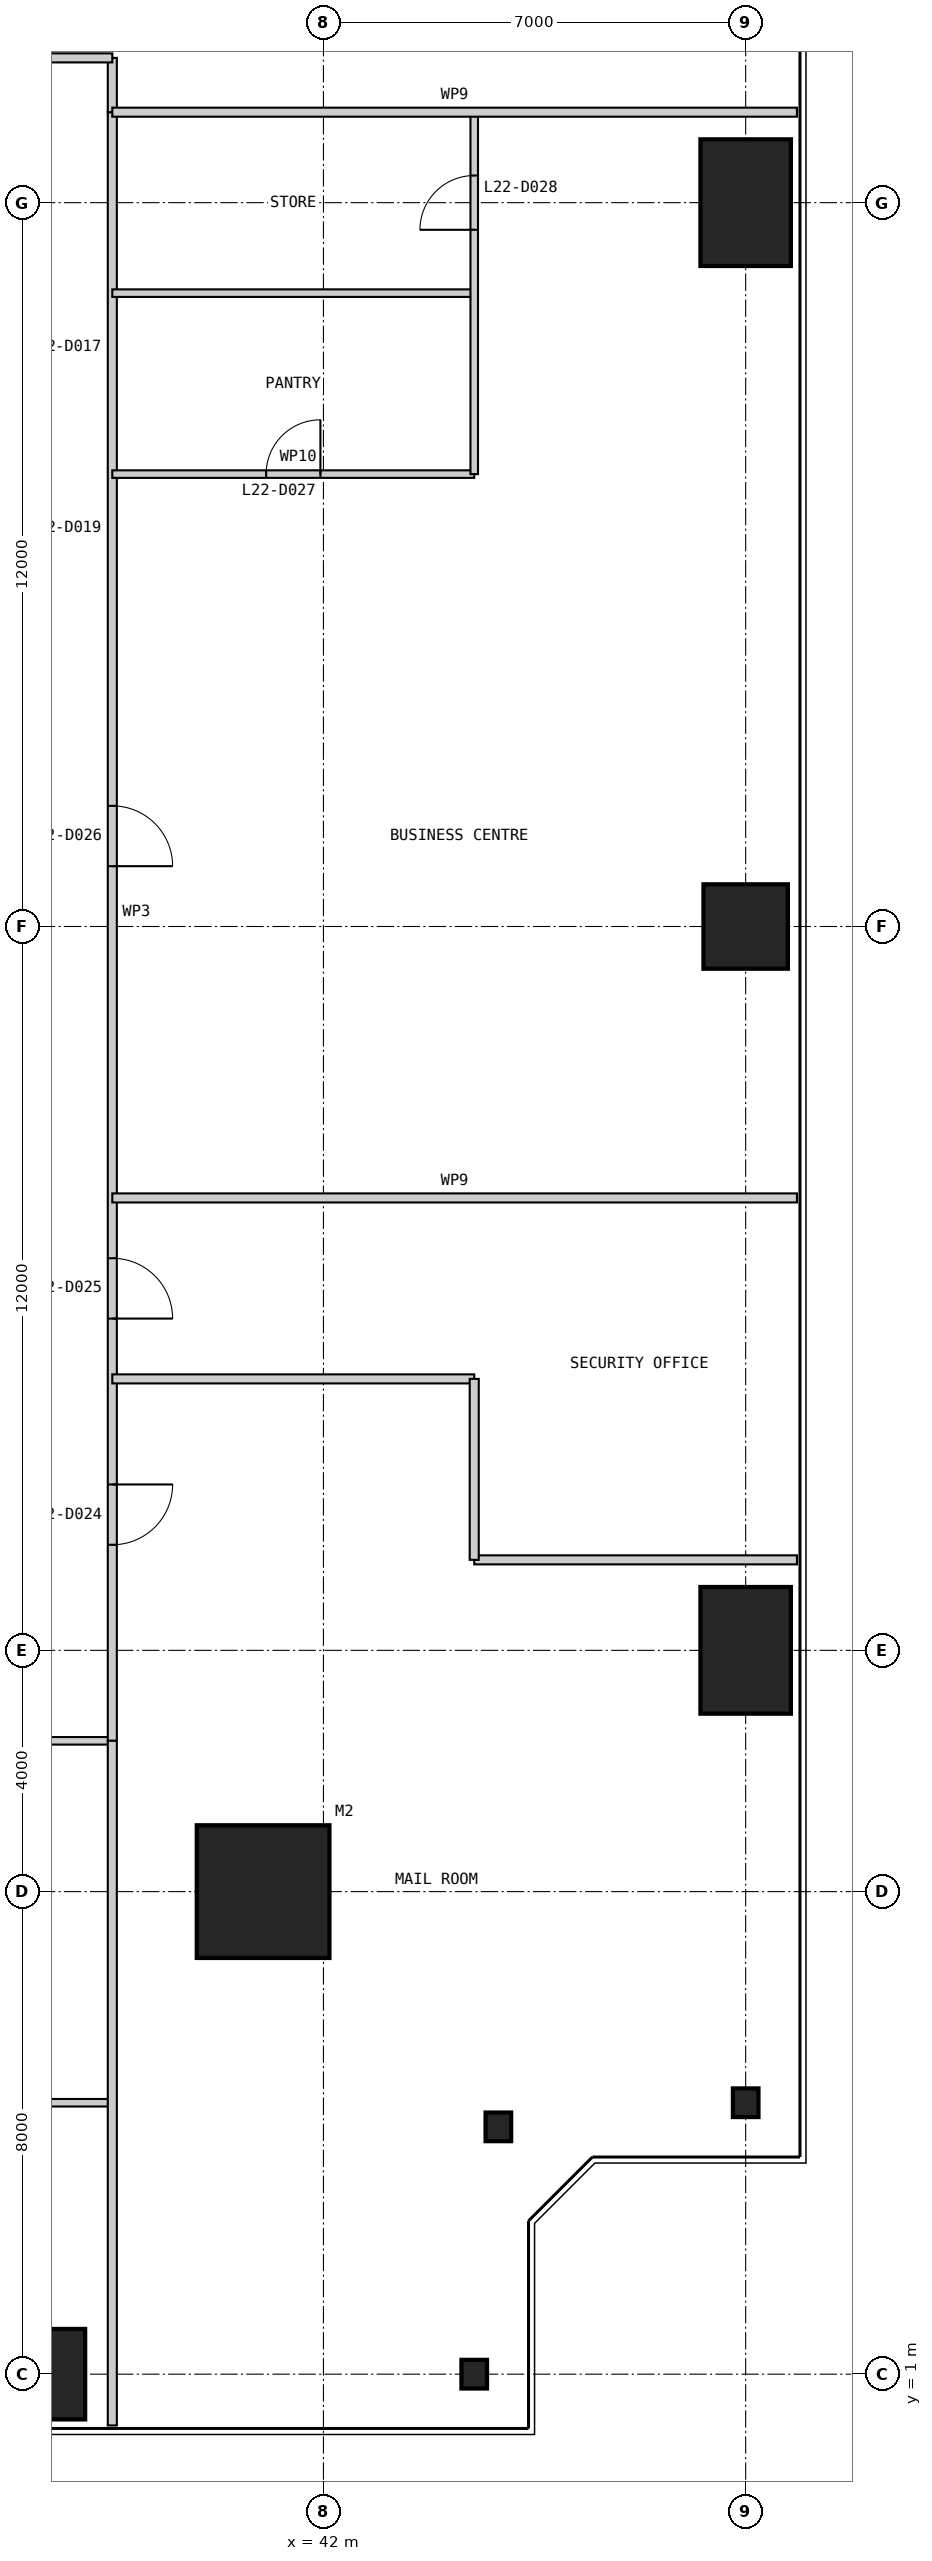
"""IFC4 building model, lengths in metres.
Left out: names, types, materials, properties, quantities, classifications, styles, units other than length and angle.
Written with IfcOpenShell. Run it as: python <this file> out.ifc"""

import sys

from ifc_helpers import new_model, si_unit, direction, frame, frame_2d, origin, origin_2d, place, context, subcontext, project, spatial, rectangle, i_section, extrude, element, fill, save


model = new_model("IFC4")
c1 = context("Model", 3, precision=1e-05, world=origin(), true_north=direction((0.0, 1.0)))
c2 = subcontext(c1, "Body", "Model", "MODEL_VIEW")
j1 = project(units=[si_unit("LENGTHUNIT", "METRE"), si_unit("PLANEANGLEUNIT", "RADIAN")], contexts=[c1])
p1 = place(None, origin())
s1 = spatial("IfcSite", under=j1, at=p1, CompositionType="ELEMENT")
p2 = place(p1, origin())
s2 = spatial("IfcBuilding", under=s1, at=p2, CompositionType="ELEMENT")
p3 = place(p2, frame((0.0, 0.0, 97.0)))
s3 = spatial("IfcBuildingStorey", under=s2, at=p3, CompositionType="ELEMENT", Elevation=97.0)
p4 = place(p3, frame((41.0, 9.0, 0.0), z_axis=(0.0, 0.0, 1.0), x_axis=(1.0, 0.0, 0.0)))
e1 = element("IfcColumn", 1, at=p4, inside=s3, PredefinedType="COLUMN", context=c2, shape_type="SweptSolid", body=[
    extrude(rectangle(XDim=2.2, YDim=2.2, at=origin_2d()), origin(), (0.0, 0.0, 1.0), 5.4),
])
p5 = place(p3, frame((37.0, 1.0, 0.0), z_axis=(0.0, 0.0, 1.0), x_axis=(1.0, 0.0, 0.0)))
e2 = element("IfcColumn", 2, at=p5, inside=s3, PredefinedType="COLUMN", context=c2, shape_type="SweptSolid", body=[
    extrude(rectangle(XDim=2.1, YDim=1.5, at=origin_2d()), origin(), (0.0, 0.0, 1.0), 5.4),
])
for number, where, z_axis, x_axis in (
    (3, (44.5, 1.0, 0.0), (0.0, 0.0, 1.0), (1.0, 0.0, 0.0)),
    (4, (44.9, 5.1, 0.0), (0.0, 0.0, 1.0), (1.0, 0.0, 0.0)),
    (5, (49.0, 5.5, 0.0), (0.0, 0.0, 1.0), (1.0, 0.0, 0.0)),
):
    element("IfcColumn", number, at=place(p3, frame(where, z_axis=z_axis, x_axis=x_axis)), inside=s3, PredefinedType="COLUMN", context=c2, shape_type="SweptSolid", body=[
        extrude(i_section(OverallWidth=0.424, OverallDepth=0.475, WebThickness=0.048, FlangeThickness=0.077, at=origin_2d()), origin(), (0.0, 0.0, 1.0), 5.4),
    ])
p6 = place(p3, frame((49.0, 13.0, 0.0), z_axis=(0.0, 0.0, 1.0), x_axis=(1.0, 0.0, 0.0)))
e6 = element("IfcColumn", 6, at=p6, inside=s3, PredefinedType="COLUMN", context=c2, shape_type="SweptSolid", body=[
    extrude(rectangle(XDim=1.5, YDim=2.1, at=origin_2d()), origin(), (0.0, 0.0, 1.0), 5.4),
])
p7 = place(p3, frame((49.0, 25.0, 0.0), z_axis=(0.0, 0.0, 1.0), x_axis=(1.0, 0.0, 0.0)))
e7 = element("IfcColumn", 7, at=p7, inside=s3, PredefinedType="COLUMN", context=c2, shape_type="SweptSolid", body=[
    extrude(rectangle(XDim=1.4, YDim=1.4, at=origin_2d()), origin(), (0.0, 0.0, 1.0), 5.4),
])
p8 = place(p3, frame((49.0, 37.0, 0.0), z_axis=(0.0, 0.0, 1.0), x_axis=(1.0, 0.0, 0.0)))
e8 = element("IfcColumn", 8, at=p8, inside=s3, PredefinedType="COLUMN", context=c2, shape_type="SweptSolid", body=[
    extrude(rectangle(XDim=1.5, YDim=2.1, at=origin_2d()), origin(), (0.0, 0.0, 1.0), 5.4),
])
for number, where, z_axis, x_axis in (
    (9, (35.5, 5.5, 0.0), (0.0, 0.0, 1.0), (1.0, 0.0, 0.0)),
    (10, (35.5, 11.5, 0.0), (0.0, 0.0, 1.0), (1.0, 0.0, 0.0)),
):
    element("IfcWall", number, at=place(p3, frame(where, z_axis=z_axis, x_axis=x_axis)), inside=s3, PredefinedType="PARTITIONING", context=c2, shape_type="SweptSolid", body=[
        extrude(rectangle(XDim=3.0, YDim=0.125, at=frame_2d((1.5, 0.0))), origin(), (0.0, 0.0, 1.0), 5.25),
    ])
p9 = place(p3, frame((38.5, 11.5, 0.0), z_axis=(0.0, 0.0, 1.0), x_axis=(0.0, 1.0, 0.0)))
e11 = element("IfcWall", 11, at=p9, inside=s3, PredefinedType="PARTITIONING", context=c2, shape_type="SweptSolid", body=[
    extrude(rectangle(XDim=27.0, YDim=0.15, at=frame_2d((13.5, 0.0))), origin(), (0.0, 0.0, 1.0), 5.25),
])
p10 = place(p9, frame((3.25, 0.0, 0.0)))
e12 = element("IfcOpeningElement", 12, at=p10, cuts=e11, PredefinedType="OPENING", context=c2, shape_type="SweptSolid", body=[
    extrude(rectangle(XDim=1.0, YDim=2.2, at=frame_2d((0.5, 1.1))), frame((0.0, 0.085, 0.0), z_axis=(0.0, -1.0, 0.0), x_axis=(1.0, 0.0, 0.0)), (0.0, 0.0, 1.0), 0.17),
])
p11 = place(p9, frame((7.0, 0.0, 0.0)))
e13 = element("IfcOpeningElement", 13, at=p11, cuts=e11, PredefinedType="OPENING", context=c2, shape_type="SweptSolid", body=[
    extrude(rectangle(XDim=1.0, YDim=2.2, at=frame_2d((0.5, 1.1))), frame((0.0, 0.085, 0.0), z_axis=(0.0, -1.0, 0.0), x_axis=(1.0, 0.0, 0.0)), (0.0, 0.0, 1.0), 0.17),
])
p12 = place(p9, frame((14.5, 0.0, 0.0)))
e14 = element("IfcOpeningElement", 14, at=p12, cuts=e11, PredefinedType="OPENING", context=c2, shape_type="SweptSolid", body=[
    extrude(rectangle(XDim=1.0, YDim=2.2, at=frame_2d((0.5, 1.1))), frame((0.0, 0.085, 0.0), z_axis=(0.0, -1.0, 0.0), x_axis=(1.0, 0.0, 0.0)), (0.0, 0.0, 1.0), 0.17),
])
p13 = place(p3, frame((38.5, 0.15, 0.0), z_axis=(0.0, 0.0, 1.0), x_axis=(0.0, 1.0, 0.0)))
e15 = element("IfcWall", 15, at=p13, inside=s3, PredefinedType="PARTITIONING", context=c2, shape_type="SweptSolid", body=[
    extrude(rectangle(XDim=11.35, YDim=0.15, at=frame_2d((5.675, 0.0))), origin(), (0.0, 0.0, 1.0), 5.25),
])
p14 = place(p3, frame((49.85, 14.5, 0.0), z_axis=(0.0, 0.0, 1.0), x_axis=(-1.0, 0.0, 0.0)))
e16 = element("IfcWall", 16, at=p14, inside=s3, PredefinedType="PARTITIONING", context=c2, shape_type="SweptSolid", body=[
    extrude(rectangle(XDim=5.35, YDim=0.15, at=frame_2d((2.675, 0.0))), origin(), (0.0, 0.0, 1.0), 5.25),
])
p15 = place(p3, frame((44.5, 17.5, 0.0), z_axis=(0.0, 0.0, 1.0), x_axis=(-1.0, 0.0, 0.0)))
e17 = element("IfcWall", 17, at=p15, inside=s3, PredefinedType="PARTITIONING", context=c2, shape_type="SweptSolid", body=[
    extrude(rectangle(XDim=6.0, YDim=0.15, at=frame_2d((3.0, 0.0))), origin(), (0.0, 0.0, 1.0), 5.25),
])
p16 = place(p3, frame((49.85, 20.5, 0.0), z_axis=(0.0, 0.0, 1.0), x_axis=(-1.0, 0.0, 0.0)))
e18 = element("IfcWall", 18, at=p16, inside=s3, PredefinedType="PARTITIONING", context=c2, shape_type="SweptSolid", body=[
    extrude(rectangle(XDim=11.35, YDim=0.15, at=frame_2d((5.675, 0.0))), origin(), (0.0, 0.0, 1.0), 5.25),
])
p17 = place(p3, frame((44.5, 32.5, 0.0), z_axis=(0.0, 0.0, 1.0), x_axis=(-1.0, 0.0, 0.0)))
e19 = element("IfcWall", 19, at=p17, inside=s3, PredefinedType="PARTITIONING", context=c2, shape_type="SweptSolid", body=[
    extrude(rectangle(XDim=6.0, YDim=0.125, at=frame_2d((3.0, 0.0))), origin(), (0.0, 0.0, 1.0), 5.25),
])
p18 = place(p17, frame((2.55, 0.0, 0.0)))
e20 = element("IfcOpeningElement", 20, at=p18, cuts=e19, PredefinedType="OPENING", context=c2, shape_type="SweptSolid", body=[
    extrude(rectangle(XDim=0.9, YDim=2.2, at=frame_2d((0.45, 1.1))), frame((0.0, 0.073, 0.0), z_axis=(0.0, -1.0, 0.0), x_axis=(1.0, 0.0, 0.0)), (0.0, 0.0, 1.0), 0.145),
])
p19 = place(p3, frame((44.5, 35.5, 0.0), z_axis=(0.0, 0.0, 1.0), x_axis=(-1.0, 0.0, 0.0)))
e21 = element("IfcWall", 21, at=p19, inside=s3, PredefinedType="PARTITIONING", context=c2, shape_type="SweptSolid", body=[
    extrude(rectangle(XDim=6.0, YDim=0.125, at=frame_2d((3.0, 0.0))), origin(), (0.0, 0.0, 1.0), 5.25),
])
p20 = place(p3, frame((44.5, 14.5, 0.0), z_axis=(0.0, 0.0, 1.0), x_axis=(0.0, 1.0, 0.0)))
e22 = element("IfcWall", 22, at=p20, inside=s3, PredefinedType="PARTITIONING", context=c2, shape_type="SweptSolid", body=[
    extrude(rectangle(XDim=3.0, YDim=0.15, at=frame_2d((1.5, 0.0))), origin(), (0.0, 0.0, 1.0), 5.25),
])
p21 = place(p3, frame((44.5, 32.5, 0.0), z_axis=(0.0, 0.0, 1.0), x_axis=(0.0, 1.0, 0.0)))
e23 = element("IfcWall", 23, at=p21, inside=s3, PredefinedType="PARTITIONING", context=c2, shape_type="SweptSolid", body=[
    extrude(rectangle(XDim=6.0, YDim=0.125, at=frame_2d((3.0, 0.0))), origin(), (0.0, 0.0, 1.0), 5.25),
])
p22 = place(p21, frame((4.05, 0.0, 0.0)))
e24 = element("IfcOpeningElement", 24, at=p22, cuts=e23, PredefinedType="OPENING", context=c2, shape_type="SweptSolid", body=[
    extrude(rectangle(XDim=0.9, YDim=2.2, at=frame_2d((0.45, 1.1))), frame((0.0, 0.073, 0.0), z_axis=(0.0, -1.0, 0.0), x_axis=(1.0, 0.0, 0.0)), (0.0, 0.0, 1.0), 0.145),
])
p23 = place(p3, frame((38.5, 38.5, 0.0), z_axis=(0.0, 0.0, 1.0), x_axis=(0.0, 1.0, 0.0)))
e25 = element("IfcWall", 25, at=p23, inside=s3, PredefinedType="PARTITIONING", context=c2, shape_type="SweptSolid", body=[
    extrude(rectangle(XDim=0.9, YDim=0.15, at=frame_2d((0.45, 0.0))), origin(), (0.0, 0.0, 1.0), 5.25),
])
p24 = place(p3, frame((38.5, 39.4, 0.0), z_axis=(0.0, 0.0, 1.0), x_axis=(-1.0, 0.0, 0.0)))
e26 = element("IfcWall", 26, at=p24, inside=s3, PredefinedType="PARTITIONING", context=c2, shape_type="SweptSolid", body=[
    extrude(rectangle(XDim=27.0, YDim=0.15, at=frame_2d((13.5, 0.0))), origin(), (0.0, 0.0, 1.0), 5.25),
])
p25 = place(p24, frame((11.5, 0.0, 0.0)))
e27 = element("IfcOpeningElement", 27, at=p25, cuts=e26, PredefinedType="OPENING", context=c2, shape_type="SweptSolid", body=[
    extrude(rectangle(XDim=1.0, YDim=2.2, at=frame_2d((0.5, 1.1))), frame((0.0, 0.085, 0.0), z_axis=(0.0, -1.0, 0.0), x_axis=(1.0, 0.0, 0.0)), (0.0, 0.0, 1.0), 0.17),
])
p26 = place(p3, frame((49.85, 38.5, 0.0), z_axis=(0.0, 0.0, 1.0), x_axis=(-1.0, 0.0, 0.0)))
e28 = element("IfcWall", 28, at=p26, inside=s3, PredefinedType="PARTITIONING", context=c2, shape_type="SweptSolid", body=[
    extrude(rectangle(XDim=11.35, YDim=0.15, at=frame_2d((5.675, 0.0))), origin(), (0.0, 0.0, 1.0), 5.25),
])
p27 = place(p10, frame((1.0, 0.0, 0.0), z_axis=(0.0, 0.0, 1.0), x_axis=(-1.0, 0.0, 0.0)))
e29 = element("IfcDoor", 29, at=p27, inside=s3, OperationType="SINGLE_SWING_LEFT", PredefinedType="DOOR", context=c2, shape_type="SweptSolid", body=[
    extrude(rectangle(XDim=1.0, YDim=2.2, at=frame_2d((0.5, 1.1))), frame((0.0, 0.025, 0.0), z_axis=(0.0, -1.0, 0.0), x_axis=(1.0, 0.0, 0.0)), (0.0, 0.0, 1.0), 0.05),
])
fill(e12, e29)
p28 = place(p11, frame((1.0, 0.0, 0.0), z_axis=(0.0, 0.0, 1.0), x_axis=(-1.0, 0.0, 0.0)))
e30 = element("IfcDoor", 30, at=p28, inside=s3, OperationType="SINGLE_SWING_RIGHT", PredefinedType="DOOR", context=c2, shape_type="SweptSolid", body=[
    extrude(rectangle(XDim=1.0, YDim=2.2, at=frame_2d((0.5, 1.1))), frame((0.0, 0.025, 0.0), z_axis=(0.0, -1.0, 0.0), x_axis=(1.0, 0.0, 0.0)), (0.0, 0.0, 1.0), 0.05),
])
fill(e13, e30)
p29 = place(p12, frame((1.0, 0.0, 0.0), z_axis=(0.0, 0.0, 1.0), x_axis=(-1.0, 0.0, 0.0)))
e31 = element("IfcDoor", 31, at=p29, inside=s3, OperationType="SINGLE_SWING_RIGHT", PredefinedType="DOOR", context=c2, shape_type="SweptSolid", body=[
    extrude(rectangle(XDim=1.0, YDim=2.2, at=frame_2d((0.5, 1.1))), frame((0.0, 0.025, 0.0), z_axis=(0.0, -1.0, 0.0), x_axis=(1.0, 0.0, 0.0)), (0.0, 0.0, 1.0), 0.05),
])
fill(e14, e31)
p30 = place(p18, frame((0.9, 0.0, 0.0), z_axis=(0.0, 0.0, 1.0), x_axis=(-1.0, 0.0, 0.0)))
e32 = element("IfcDoor", 32, at=p30, inside=s3, OperationType="SINGLE_SWING_RIGHT", PredefinedType="DOOR", context=c2, shape_type="SweptSolid", body=[
    extrude(rectangle(XDim=0.9, YDim=2.2, at=frame_2d((0.45, 1.1))), frame((0.0, 0.025, 0.0), z_axis=(0.0, -1.0, 0.0), x_axis=(1.0, 0.0, 0.0)), (0.0, 0.0, 1.0), 0.05),
])
fill(e20, e32)
p31 = place(p22, origin())
e33 = element("IfcDoor", 33, at=p31, inside=s3, OperationType="SINGLE_SWING_LEFT", PredefinedType="DOOR", context=c2, shape_type="SweptSolid", body=[
    extrude(rectangle(XDim=0.9, YDim=2.2, at=frame_2d((0.45, 1.1))), frame((0.0, 0.025, 0.0), z_axis=(0.0, -1.0, 0.0), x_axis=(1.0, 0.0, 0.0)), (0.0, 0.0, 1.0), 0.05),
])
fill(e24, e33)
save(model, sys.argv[1])
